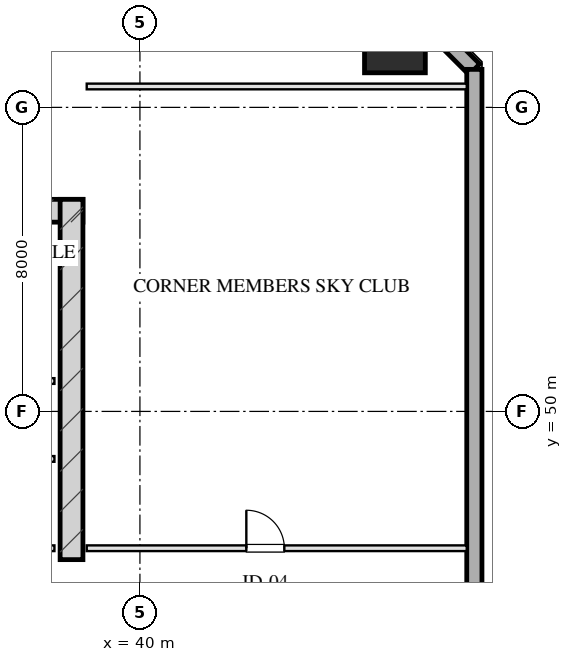
"""IFC4 building model, lengths in metres.
Left out: names, types, materials, properties, quantities, classifications, styles, units other than length and angle.
Written with IfcOpenShell. Run it as: python <this file> out.ifc"""

import sys

from ifc_helpers import new_model, si_unit, direction, frame, frame_2d, origin, origin_2d, place, context, subcontext, project, spatial, rectangle, hollow_rectangle, extrude, element, fill, save


model = new_model("IFC4")
c1 = context("Model", 3, precision=1e-05, world=origin(), true_north=direction((0.0, 1.0)))
c2 = subcontext(c1, "Body", "Model", "MODEL_VIEW")
j1 = project(units=[si_unit("LENGTHUNIT", "METRE"), si_unit("PLANEANGLEUNIT", "RADIAN")], contexts=[c1])
p1 = place(None, origin())
s1 = spatial("IfcSite", under=j1, at=p1, CompositionType="ELEMENT")
p2 = place(p1, origin())
s2 = spatial("IfcBuilding", under=s1, at=p2, CompositionType="ELEMENT")
p3 = place(p2, frame((0.0, 0.0, 152.95)))
s3 = spatial("IfcBuildingStorey", under=s2, at=p3, CompositionType="ELEMENT", Elevation=152.95)
p4 = place(p3, frame((21.5, 55.28, 0.0), z_axis=(0.0, 0.0, 1.0), x_axis=(1.0, 0.0, 0.0)))
e1 = element("IfcWall", 1, at=p4, inside=s3, PredefinedType="SHEAR", context=c2, shape_type="SweptSolid", body=[
    extrude(rectangle(XDim=17.0, YDim=0.6, at=frame_2d((8.5, 0.0))), origin(), (0.0, 0.0, 1.0), 3.45),
])
p5 = place(p3, frame((38.2, 46.1, 0.0), z_axis=(0.0, 0.0, 1.0), x_axis=(0.0, 1.0, 0.0)))
e2 = element("IfcWall", 2, at=p5, inside=s3, PredefinedType="SHEAR", context=c2, shape_type="SweptSolid", body=[
    extrude(rectangle(XDim=9.48, YDim=0.6, at=frame_2d((4.74, 0.0))), origin(), (0.0, 0.0, 1.0), 3.45),
])
p6 = place(p3, frame((46.71, 59.71, 0.0), z_axis=(0.0, 0.0, 1.0), x_axis=(1.0, 0.0, 0.0)))
e3 = element("IfcColumn", 3, at=p6, inside=s3, PredefinedType="COLUMN", context=c2, shape_type="SweptSolid", body=[
    extrude(hollow_rectangle(XDim=1.6, YDim=1.6, WallThickness=0.055, at=origin_2d()), origin(), (0.0, 0.0, 1.0), 3.451),
])
p7 = place(p3, frame((46.0, 61.8, 0.0), z_axis=(0.0, 0.0, 1.0), x_axis=(0.707106781187, -0.707106781187, 0.0)))
e4 = element("IfcWall", 4, at=p7, inside=s3, PredefinedType="SOLIDWALL", context=c2, shape_type="SweptSolid", body=[
    extrude(rectangle(XDim=3.96, YDim=0.4, at=frame_2d((1.98, 0.0))), origin(), (0.0, 0.0, 1.0), 2.61),
])
p8 = place(p3, frame((48.8, 59.0, 0.0), z_axis=(0.0, 0.0, 1.0), x_axis=(0.0, -1.0, 0.0)))
e5 = element("IfcWall", 5, at=p8, inside=s3, PredefinedType="SOLIDWALL", context=c2, shape_type="SweptSolid", body=[
    extrude(rectangle(XDim=50.0, YDim=0.4, at=frame_2d((25.0, 0.0))), origin(), (0.0, 0.0, 1.0), 2.61),
])
p9 = place(p8, frame((30.25, 0.0, 0.0)))
e6 = element("IfcOpeningElement", 6, at=p9, cuts=e5, PredefinedType="OPENING", context=c2, shape_type="SweptSolid", body=[
    extrude(rectangle(XDim=1.1, YDim=2.15, at=frame_2d((0.55, 1.075))), frame((0.0, 0.21, 0.0), z_axis=(0.0, -1.0, 0.0), x_axis=(1.0, 0.0, 0.0)), (0.0, 0.0, 1.0), 0.42),
])
p10 = place(p3, frame((33.95, 46.4, 0.0), z_axis=(0.0, 0.0, 1.0), x_axis=(1.0, 0.0, 0.0)))
e7 = element("IfcWall", 7, at=p10, inside=s3, PredefinedType="PARTITIONING", context=c2, shape_type="SweptSolid", body=[
    extrude(rectangle(XDim=3.8, YDim=0.15, at=frame_2d((1.9, 0.0))), origin(), (0.0, 0.0, 1.0), 3.175),
])
p11 = place(p10, frame((0.22, 0.0, 0.0)))
e8 = element("IfcOpeningElement", 8, at=p11, cuts=e7, PredefinedType="OPENING", context=c2, shape_type="SweptSolid", body=[
    extrude(rectangle(XDim=0.95, YDim=2.05, at=frame_2d((0.475, 1.025))), frame((0.0, 0.085, 0.0), z_axis=(0.0, -1.0, 0.0), x_axis=(1.0, 0.0, 0.0)), (0.0, 0.0, 1.0), 0.17),
])
p12 = place(p10, frame((1.95, 0.0, 0.0)))
e9 = element("IfcOpeningElement", 9, at=p12, cuts=e7, PredefinedType="OPENING", context=c2, shape_type="SweptSolid", body=[
    extrude(rectangle(XDim=0.9, YDim=2.05, at=frame_2d((0.45, 1.025))), frame((0.0, 0.085, 0.0), z_axis=(0.0, -1.0, 0.0), x_axis=(1.0, 0.0, 0.0)), (0.0, 0.0, 1.0), 0.17),
])
for number, where, z_axis, x_axis in (
    (10, (35.45, 50.8, 0.0), (0.0, 0.0, 1.0), (1.0, 0.0, 0.0)),
    (11, (35.45, 48.75, 0.0), (0.0, 0.0, 1.0), (1.0, 0.0, 0.0)),
):
    element("IfcWall", number, at=place(p3, frame(where, z_axis=z_axis, x_axis=x_axis)), inside=s3, PredefinedType="PARTITIONING", context=c2, shape_type="SweptSolid", body=[
        extrude(rectangle(XDim=2.3, YDim=0.15, at=frame_2d((1.15, 0.0))), origin(), (0.0, 0.0, 1.0), 3.175),
    ])
p13 = place(p3, frame((38.6, 58.55, 0.0), z_axis=(0.0, 0.0, 1.0), x_axis=(1.0, 0.0, 0.0)))
e12 = element("IfcWall", 12, at=p13, inside=s3, PredefinedType="PARTITIONING", context=c2, shape_type="SweptSolid", body=[
    extrude(rectangle(XDim=10.0, YDim=0.15, at=frame_2d((5.0, 0.0))), origin(), (0.0, 0.0, 1.0), 3.175),
])
p14 = place(p3, frame((38.6, 46.4, 0.0), z_axis=(0.0, 0.0, 1.0), x_axis=(1.0, 0.0, 0.0)))
e13 = element("IfcWall", 13, at=p14, inside=s3, PredefinedType="PARTITIONING", context=c2, shape_type="SweptSolid", body=[
    extrude(rectangle(XDim=10.0, YDim=0.15, at=frame_2d((5.0, 0.0))), origin(), (0.0, 0.0, 1.0), 3.175),
])
p15 = place(p14, frame((4.2, 0.0, 0.0)))
e14 = element("IfcOpeningElement", 14, at=p15, cuts=e13, PredefinedType="OPENING", context=c2, shape_type="SweptSolid", body=[
    extrude(rectangle(XDim=1.0, YDim=2.05, at=frame_2d((0.5, 1.025))), frame((0.0, 0.085, 0.0), z_axis=(0.0, -1.0, 0.0), x_axis=(1.0, 0.0, 0.0)), (0.0, 0.0, 1.0), 0.17),
])
p16 = place(p15, origin())
e15 = element("IfcDoor", 15, at=p16, inside=s3, OperationType="SINGLE_SWING_LEFT", PredefinedType="DOOR", context=c2, shape_type="SweptSolid", body=[
    extrude(rectangle(XDim=1.0, YDim=2.05, at=frame_2d((0.5, 1.025))), frame((0.0, 0.025, 0.0), z_axis=(0.0, -1.0, 0.0), x_axis=(1.0, 0.0, 0.0)), (0.0, 0.0, 1.0), 0.05),
])
fill(e14, e15)
save(model, sys.argv[1])
